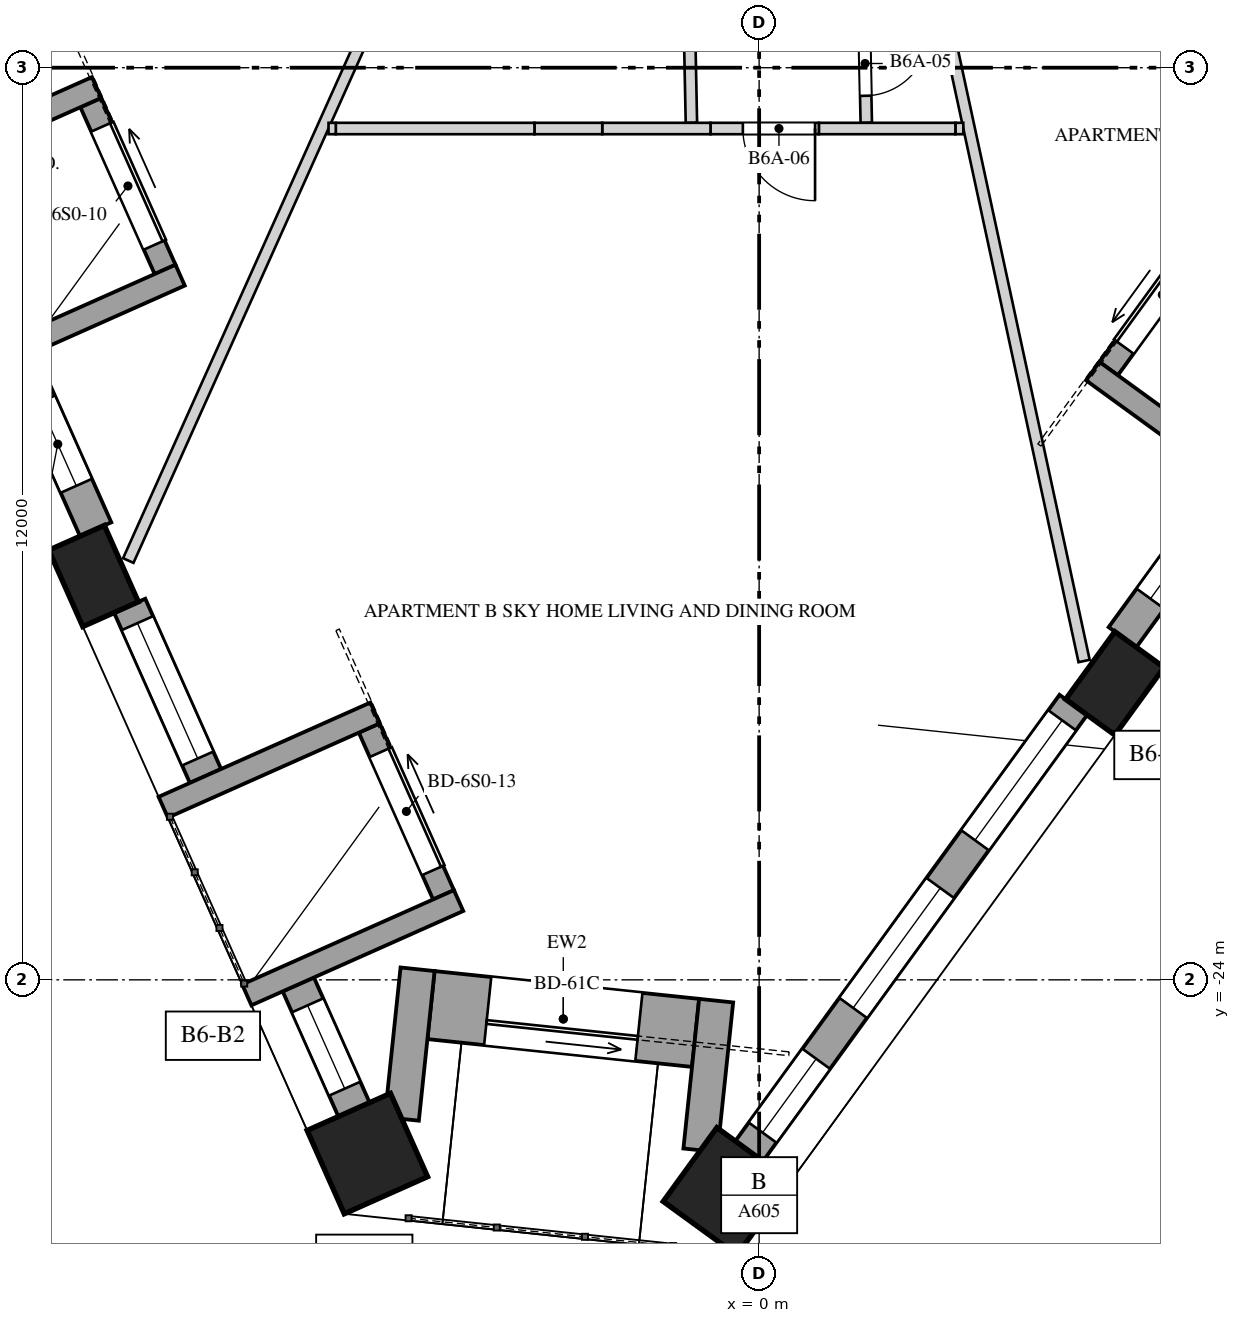
"""IFC4 building model, lengths in metres.
Left out: names, types, materials, properties, quantities, classifications, styles, units other than length and angle.
Written with IfcOpenShell. Run it as: python <this file> out.ifc"""

import sys

from ifc_helpers import new_model, si_unit, direction, frame, frame_2d, origin, origin_2d, place, context, subcontext, project, spatial, polyline, rectangle, outline, extrude, element, fill, save


model = new_model("IFC4")
c1 = context("Model", 3, precision=1e-05, world=origin(), true_north=direction((0.0, 1.0)))
c2 = subcontext(c1, "Body", "Model", "MODEL_VIEW")
j1 = project(units=[si_unit("LENGTHUNIT", "METRE"), si_unit("PLANEANGLEUNIT", "RADIAN")], contexts=[c1])
p1 = place(None, origin())
s1 = spatial("IfcSite", under=j1, at=p1, CompositionType="ELEMENT")
p2 = place(p1, origin())
s2 = spatial("IfcBuilding", under=s1, at=p2, CompositionType="ELEMENT")
p3 = place(p2, frame((0.0, 0.0, 241.2)))
s3 = spatial("IfcBuildingStorey", under=s2, at=p3, CompositionType="ELEMENT", Elevation=241.2)
p4 = place(p3, frame((-8.756, -18.687, 0.0), z_axis=(0.0, 0.0, 1.0), x_axis=(0.406736643076, -0.913545457643, 0.0)))
e1 = element("IfcColumn", 1, at=p4, inside=s3, PredefinedType="COLUMN", context=c2, shape_type="SweptSolid", body=[
    extrude(rectangle(XDim=1.1, YDim=0.8, at=origin_2d()), origin(), (0.0, 0.0, 1.0), 4.0),
])
for number, where, z_axis, x_axis in (
    (2, (-5.154, -26.286, 0.0), (0.0, 0.0, 1.0), (0.407, -0.914, 0.0)),
    (3, (-0.423, -26.783, 0.0), (0.0, 0.0, 1.0), (0.588, 0.809, 0.0)),
):
    element("IfcColumn", number, at=place(p3, frame(where, z_axis=z_axis, x_axis=x_axis)), inside=s3, PredefinedType="COLUMN", context=c2, shape_type="SweptSolid", body=[
        extrude(rectangle(XDim=1.2, YDim=1.2, at=origin_2d()), origin(), (0.0, 0.0, 1.0), 4.0),
    ])
p5 = place(p3, frame((4.68, -20.099, 0.0), z_axis=(0.0, 0.0, 1.0), x_axis=(0.587785252292, 0.809016994375, 0.0)))
e4 = element("IfcColumn", 4, at=p5, inside=s3, PredefinedType="COLUMN", context=c2, shape_type="SweptSolid", body=[
    extrude(rectangle(XDim=1.1, YDim=0.8, at=origin_2d()), origin(), (0.0, 0.0, 1.0), 4.0),
])
p6 = place(p3, frame((-9.726, -15.833, 0.0), z_axis=(0.0, 0.0, 1.0), x_axis=(0.406701876909, -0.913560935745, 0.0)))
e5 = element("IfcWall", 5, at=p6, inside=s3, PredefinedType="SOLIDWALL", context=c2, shape_type="SweptSolid", body=[
    extrude(rectangle(XDim=2.452, YDim=0.45, at=frame_2d((1.226, 0.0))), origin(), (0.0, 0.0, 1.0), 3.3),
])
p7 = place(p6, frame((0.626, 0.0, 0.4)))
e6 = element("IfcOpeningElement", 6, at=p7, cuts=e5, PredefinedType="OPENING", context=c2, shape_type="SweptSolid", body=[
    extrude(rectangle(XDim=1.2, YDim=2.75, at=frame_2d((0.6, 1.375))), frame((0.0, 0.235, 0.0), z_axis=(0.0, -1.0, 0.0), x_axis=(1.0, 0.0, 0.0)), (0.0, 0.0, 1.0), 0.47),
])
p8 = place(p3, frame((-8.281, -19.078, 0.0), z_axis=(0.0, 0.0, 1.0), x_axis=(0.406701876909, -0.913560935745, 0.0)))
e7 = element("IfcWall", 7, at=p8, inside=s3, PredefinedType="SOLIDWALL", context=c2, shape_type="SweptSolid", body=[
    extrude(rectangle(XDim=2.452, YDim=0.45, at=frame_2d((1.226, 0.0))), origin(), (0.0, 0.0, 1.0), 3.3),
])
p9 = place(p8, frame((0.251, 0.0, 0.4)))
e8 = element("IfcOpeningElement", 8, at=p9, cuts=e7, PredefinedType="OPENING", context=c2, shape_type="SweptSolid", body=[
    extrude(rectangle(XDim=1.95, YDim=2.75, at=frame_2d((0.975, 1.375))), frame((0.0, 0.235, 0.0), z_axis=(0.0, -1.0, 0.0), x_axis=(1.0, 0.0, 0.0)), (0.0, 0.0, 1.0), 0.47),
])
p10 = place(p3, frame((-6.063, -24.061, 0.0), z_axis=(0.0, 0.0, 1.0), x_axis=(0.406666293293, -0.913576776138, 0.0)))
e9 = element("IfcWall", 9, at=p10, inside=s3, PredefinedType="SOLIDWALL", context=c2, shape_type="SweptSolid", body=[
    extrude(rectangle(XDim=1.802, YDim=0.45, at=frame_2d((0.901, 0.0))), origin(), (0.0, 0.0, 1.0), 3.3),
])
p11 = place(p10, frame((0.301, 0.0, 0.4)))
e10 = element("IfcOpeningElement", 10, at=p11, cuts=e9, PredefinedType="OPENING", context=c2, shape_type="SweptSolid", body=[
    extrude(rectangle(XDim=1.2, YDim=2.1, at=frame_2d((0.6, 1.05))), frame((0.0, 0.235, 0.0), z_axis=(0.0, -1.0, 0.0), x_axis=(1.0, 0.0, 0.0)), (0.0, 0.0, 1.0), 0.47),
])
p12 = place(p3, frame((-0.131, -26.253, 0.0), z_axis=(0.0, 0.0, 1.0), x_axis=(0.587781549195, 0.80901968482, 0.0)))
e11 = element("IfcWall", 11, at=p12, inside=s3, PredefinedType="SOLIDWALL", context=c2, shape_type="SweptSolid", body=[
    extrude(rectangle(XDim=7.257, YDim=0.45, at=frame_2d((3.628, 0.0))), origin(), (0.0, 0.0, 1.0), 3.3),
])
p13 = place(p12, frame((0.301, 0.0, 0.4)))
e12 = element("IfcOpeningElement", 12, at=p13, cuts=e11, PredefinedType="OPENING", context=c2, shape_type="SweptSolid", body=[
    extrude(rectangle(XDim=1.2, YDim=2.1, at=frame_2d((0.6, 1.05))), frame((0.0, 0.235, 0.0), z_axis=(0.0, -1.0, 0.0), x_axis=(1.0, 0.0, 0.0)), (0.0, 0.0, 1.0), 0.47),
])
p14 = place(p12, frame((2.328, 0.0, 0.4)))
e13 = element("IfcOpeningElement", 13, at=p14, cuts=e11, PredefinedType="OPENING", context=c2, shape_type="SweptSolid", body=[
    extrude(rectangle(XDim=1.95, YDim=2.75, at=frame_2d((0.975, 1.375))), frame((0.0, 0.235, 0.0), z_axis=(0.0, -1.0, 0.0), x_axis=(1.0, 0.0, 0.0)), (0.0, 0.0, 1.0), 0.47),
])
p15 = place(p12, frame((5.056, 0.0, 0.4)))
e14 = element("IfcOpeningElement", 14, at=p15, cuts=e11, PredefinedType="OPENING", context=c2, shape_type="SweptSolid", body=[
    extrude(rectangle(XDim=1.95, YDim=2.75, at=frame_2d((0.975, 1.375))), frame((0.0, 0.235, 0.0), z_axis=(0.0, -1.0, 0.0), x_axis=(1.0, 0.0, 0.0)), (0.0, 0.0, 1.0), 0.47),
])
p16 = place(p3, frame((4.781, -19.493, 0.0), z_axis=(0.0, 0.0, 1.0), x_axis=(0.587792773076, 0.809011530152, 0.0)))
e15 = element("IfcWall", 15, at=p16, inside=s3, PredefinedType="SOLIDWALL", context=c2, shape_type="SweptSolid", body=[
    extrude(rectangle(XDim=2.452, YDim=0.45, at=frame_2d((1.226, 0.0))), origin(), (0.0, 0.0, 1.0), 3.3),
])
p17 = place(p16, frame((0.626, 0.0, 0.4)))
e16 = element("IfcOpeningElement", 16, at=p17, cuts=e15, PredefinedType="OPENING", context=c2, shape_type="SweptSolid", body=[
    extrude(rectangle(XDim=1.2, YDim=2.75, at=frame_2d((0.6, 1.375))), frame((0.0, 0.235, 0.0), z_axis=(0.0, -1.0, 0.0), x_axis=(1.0, 0.0, 0.0)), (0.0, 0.0, 1.0), 0.47),
])
p18 = place(p3, frame((-8.793, -12.459, 0.0), z_axis=(0.0, 0.0, 1.0), x_axis=(0.406723017018, -0.913551524232, 0.0)))
e17 = element("IfcWall", 17, at=p18, inside=s3, PredefinedType="SOLIDWALL", context=c2, shape_type="SweptSolid", body=[
    extrude(rectangle(XDim=2.402, YDim=0.3, at=frame_2d((1.201, 0.0))), origin(), (0.0, 0.0, 1.0), 3.3),
])
p19 = place(p18, frame((0.351, 0.0, 0.0)))
e18 = element("IfcOpeningElement", 18, at=p19, cuts=e17, PredefinedType="OPENING", context=c2, shape_type="SweptSolid", body=[
    extrude(rectangle(XDim=1.7, YDim=2.5, at=frame_2d((0.85, 1.25))), frame((0.0, 0.16, 0.0), z_axis=(0.0, -1.0, 0.0), x_axis=(1.0, 0.0, 0.0)), (0.0, 0.0, 1.0), 0.32),
])
for number, where, z_axis, x_axis in (
    (19, (-11.503, -13.501, 0.0), (0.0, 0.0, 1.0), (0.914, 0.407, 0.0)),
    (20, (-10.404, -15.97, 0.0), (0.0, 0.0, 1.0), (0.914, 0.407, 0.0)),
):
    element("IfcWall", number, at=place(p3, frame(where, z_axis=z_axis, x_axis=x_axis)), inside=s3, PredefinedType="SOLIDWALL", context=c2, shape_type="SweptSolid", body=[
        extrude(rectangle(XDim=3.05, YDim=0.3, at=frame_2d((1.525, 0.0))), origin(), (0.0, 0.0, 1.0), 3.3),
    ])
p20 = place(p3, frame((-5.129, -20.687, 0.0), z_axis=(0.0, 0.0, 1.0), x_axis=(0.406723017018, -0.913551524232, 0.0)))
e21 = element("IfcWall", 21, at=p20, inside=s3, PredefinedType="SOLIDWALL", context=c2, shape_type="SweptSolid", body=[
    extrude(rectangle(XDim=2.402, YDim=0.3, at=frame_2d((1.201, 0.0))), origin(), (0.0, 0.0, 1.0), 3.3),
])
p21 = place(p20, frame((0.351, 0.0, 0.0)))
e22 = element("IfcOpeningElement", 22, at=p21, cuts=e21, PredefinedType="OPENING", context=c2, shape_type="SweptSolid", body=[
    extrude(rectangle(XDim=1.7, YDim=2.5, at=frame_2d((0.85, 1.25))), frame((0.0, 0.16, 0.0), z_axis=(0.0, -1.0, 0.0), x_axis=(1.0, 0.0, 0.0)), (0.0, 0.0, 1.0), 0.32),
])
for number, where, z_axis, x_axis in (
    (23, (-7.84, -21.729, 0.0), (0.0, 0.0, 1.0), (0.914, 0.407, 0.0)),
    (24, (-6.74, -24.198, 0.0), (0.0, 0.0, 1.0), (0.914, 0.407, 0.0)),
):
    element("IfcWall", number, at=place(p3, frame(where, z_axis=z_axis, x_axis=x_axis)), inside=s3, PredefinedType="SOLIDWALL", context=c2, shape_type="SweptSolid", body=[
        extrude(rectangle(XDim=3.05, YDim=0.3, at=frame_2d((1.525, 0.0))), origin(), (0.0, 0.0, 1.0), 3.3),
    ])
p22 = place(p3, frame((4.598, -15.958, 0.0), z_axis=(0.0, 0.0, 1.0), x_axis=(0.587833242688, 0.808982125137, 0.0)))
e25 = element("IfcWall", 25, at=p22, inside=s3, PredefinedType="SOLIDWALL", context=c2, shape_type="SweptSolid", body=[
    extrude(rectangle(XDim=2.402, YDim=0.3, at=frame_2d((1.201, 0.0))), origin(), (0.0, 0.0, 1.0), 3.3),
])
p23 = place(p22, frame((0.351, 0.0, 0.0)))
e26 = element("IfcOpeningElement", 26, at=p23, cuts=e25, PredefinedType="OPENING", context=c2, shape_type="SweptSolid", body=[
    extrude(rectangle(XDim=1.7, YDim=2.5, at=frame_2d((0.85, 1.25))), frame((0.0, 0.16, 0.0), z_axis=(0.0, -1.0, 0.0), x_axis=(1.0, 0.0, 0.0)), (0.0, 0.0, 1.0), 0.32),
])
p24 = place(p3, frame((6.856, -17.784, 0.0), z_axis=(0.0, 0.0, 1.0), x_axis=(-0.80902328748, 0.587776590479, 0.0)))
e27 = element("IfcWall", 27, at=p24, inside=s3, PredefinedType="SOLIDWALL", context=c2, shape_type="SweptSolid", body=[
    extrude(rectangle(XDim=3.05, YDim=0.3, at=frame_2d((1.525, 0.0))), origin(), (0.0, 0.0, 1.0), 3.3),
])
p25 = place(p3, frame((-0.836, -24.698, 0.0), z_axis=(0.0, 0.0, 1.0), x_axis=(-0.994518821828, 0.104557701916, 0.0)))
e28 = element("IfcWall", 28, at=p25, inside=s3, PredefinedType="SOLIDWALL", context=c2, shape_type="SweptSolid", body=[
    extrude(rectangle(XDim=3.5, YDim=0.9, at=frame_2d((1.75, 0.0))), origin(), (0.0, 0.0, 1.0), 3.3),
])
p26 = place(p25, frame((0.75, 0.0, 0.0)))
e29 = element("IfcOpeningElement", 29, at=p26, cuts=e28, PredefinedType="OPENING", context=c2, shape_type="SweptSolid", body=[
    extrude(rectangle(XDim=2.0, YDim=2.4, at=frame_2d((1.0, 1.2))), frame((0.0, 0.46, 0.0), z_axis=(0.0, -1.0, 0.0), x_axis=(1.0, 0.0, 0.0)), (0.0, 0.0, 1.0), 0.92),
])
for number, where, z_axis, x_axis in (
    (30, (-0.772, -26.242, 0.0), (0.0, 0.0, 1.0), (0.104, 0.995, 0.0)),
    (31, (-4.701, -25.829, 0.0), (0.0, 0.0, 1.0), (0.105, 0.995, 0.0)),
):
    element("IfcWall", number, at=place(p3, frame(where, z_axis=z_axis, x_axis=x_axis)), inside=s3, PredefinedType="SOLIDWALL", context=c2, shape_type="SweptSolid", body=[
        extrude(rectangle(XDim=1.979, YDim=0.45, at=frame_2d((0.99, 0.0))), origin(), (0.0, 0.0, 1.0), 2.55),
    ])
p27 = place(p3, frame((-8.3, -18.484, 0.0), z_axis=(0.0, 0.0, 1.0), x_axis=(0.409625524412, 0.9122537639, 0.0)))
e32 = element("IfcWall", 32, at=p27, inside=s3, PredefinedType="PARTITIONING", context=c2, shape_type="SweptSolid", body=[
    extrude(rectangle(XDim=9.327, YDim=0.15, at=frame_2d((4.664, 0.0))), origin(), (0.0, 0.0, 1.0), 2.75),
])
p28 = place(p3, frame((-0.891, -12.725, 0.0), z_axis=(0.0, 0.0, 1.0), x_axis=(-0.020389814815, 0.999792106116, 0.0)))
e33 = element("IfcWall", 33, at=p28, inside=s3, PredefinedType="PARTITIONING", context=c2, shape_type="SweptSolid", body=[
    extrude(rectangle(XDim=2.826, YDim=0.15, at=frame_2d((1.413, 0.0))), origin(), (0.0, 0.0, 1.0), 3.65),
])
p29 = place(p3, frame((1.352, -9.9, 0.0), z_axis=(0.0, 0.0, 1.0), x_axis=(0.020303452986, -0.999793863652, 0.0)))
e34 = element("IfcWall", 34, at=p29, inside=s3, PredefinedType="PARTITIONING", context=c2, shape_type="SweptSolid", body=[
    extrude(rectangle(XDim=2.826, YDim=0.15, at=frame_2d((1.413, 0.0))), origin(), (0.0, 0.0, 1.0), 3.65),
])
p30 = place(p29, frame((1.62, 0.0, 0.0)))
e35 = element("IfcOpeningElement", 35, at=p30, cuts=e34, PredefinedType="OPENING", context=c2, shape_type="SweptSolid", body=[
    extrude(rectangle(XDim=0.85, YDim=2.4, at=frame_2d((0.425, 1.2))), frame((0.0, 0.085, 0.0), z_axis=(0.0, -1.0, 0.0), x_axis=(1.0, 0.0, 0.0)), (0.0, 0.0, 1.0), 0.17),
])
p31 = place(p3, frame((2.153, -9.975, 0.0), z_axis=(0.0, 0.0, 1.0), x_axis=(0.210986150263, -0.977489050781, 0.0)))
e36 = element("IfcWall", 36, at=p31, inside=s3, PredefinedType="PARTITIONING", context=c2, shape_type="SweptSolid", body=[
    extrude(rectangle(XDim=10.057, YDim=0.15, at=frame_2d((5.028, 0.0))), origin(), (0.0, 0.0, 1.0), 2.75),
])
p32 = place(p3, frame((2.686, -12.8, 0.0), z_axis=(0.0, 0.0, 1.0), x_axis=(-1.0, 0.0, 0.0)))
e37 = element("IfcWall", 37, at=p32, inside=s3, PredefinedType="PARTITIONING", context=c2, shape_type="SweptSolid", body=[
    extrude(rectangle(XDim=0.104, YDim=0.15, at=frame_2d((0.052, 0.0))), origin(), (0.0, 0.0, 1.0), 2.75),
])
p33 = place(p3, frame((2.582, -12.8, 0.0), z_axis=(0.0, 0.0, 1.0), x_axis=(-1.0, 0.0, 0.0)))
e38 = element("IfcWall", 38, at=p33, inside=s3, PredefinedType="PARTITIONING", context=c2, shape_type="SweptSolid", body=[
    extrude(rectangle(XDim=1.796, YDim=0.15, at=frame_2d((0.898, 0.0))), origin(), (0.0, 0.0, 1.0), 3.65),
])
p34 = place(p3, frame((0.786, -12.8, 0.0), z_axis=(0.0, 0.0, 1.0), x_axis=(-1.0, 0.0, 0.0)))
e39 = element("IfcWall", 39, at=p34, inside=s3, PredefinedType="PARTITIONING", context=c2, shape_type="SweptSolid", body=[
    extrude(outline(polyline([(0.0, 0.0), (1.426, 0.0), (1.426, 2.55), (0.551, 2.55), (0.551, 3.65), (0.0, 3.65), (0.0, 0.0)])), frame((0.0, 0.075, 0.0), z_axis=(0.0, -1.0, 0.0), x_axis=(1.0, 0.0, 0.0)), (0.0, 0.0, 1.0), 0.15),
])
p35 = place(p34, frame((0.05, 0.0, 0.0)))
e40 = element("IfcOpeningElement", 40, at=p35, cuts=e39, PredefinedType="OPENING", context=c2, shape_type="SweptSolid", body=[
    extrude(rectangle(XDim=0.95, YDim=2.4, at=frame_2d((0.475, 1.2))), frame((0.0, 0.085, 0.0), z_axis=(0.0, -1.0, 0.0), x_axis=(1.0, 0.0, 0.0)), (0.0, 0.0, 1.0), 0.17),
])
p36 = place(p3, frame((-0.64, -12.8, 0.0), z_axis=(0.0, 0.0, 1.0), x_axis=(-1.0, 0.0, 0.0)))
e41 = element("IfcWall", 41, at=p36, inside=s3, PredefinedType="PARTITIONING", context=c2, shape_type="SweptSolid", body=[
    extrude(rectangle(XDim=1.424, YDim=0.15, at=frame_2d((0.712, 0.0))), origin(), (0.0, 0.0, 1.0), 3.65),
])
p37 = place(p3, frame((-2.064, -12.8, 0.0), z_axis=(0.0, 0.0, 1.0), x_axis=(-1.0, 0.0, 0.0)))
e42 = element("IfcWall", 42, at=p37, inside=s3, PredefinedType="PARTITIONING", context=c2, shape_type="SweptSolid", body=[
    extrude(rectangle(XDim=0.892, YDim=0.15, at=frame_2d((0.446, 0.0))), origin(), (0.0, 0.0, 1.0), 2.55),
])
p38 = place(p3, frame((-2.956, -12.8, 0.0), z_axis=(0.0, 0.0, 1.0), x_axis=(-1.0, 0.0, 0.0)))
e43 = element("IfcWall", 43, at=p38, inside=s3, PredefinedType="PARTITIONING", context=c2, shape_type="SweptSolid", body=[
    extrude(rectangle(XDim=2.614, YDim=0.15, at=frame_2d((1.307, 0.0))), origin(), (0.0, 0.0, 1.0), 3.65),
])
p39 = place(p3, frame((-5.57, -12.8, 0.0), z_axis=(0.0, 0.0, 1.0), x_axis=(-1.0, 0.0, 0.0)))
e44 = element("IfcWall", 44, at=p39, inside=s3, PredefinedType="PARTITIONING", context=c2, shape_type="SweptSolid", body=[
    extrude(rectangle(XDim=0.095, YDim=0.15, at=frame_2d((0.048, 0.0))), origin(), (0.0, 0.0, 1.0), 2.75),
])
p40 = place(p7, origin())
e45 = element("IfcWindow", 45, at=p40, inside=s3, PartitioningType="SINGLE_PANEL", PredefinedType="WINDOW", context=c2, shape_type="SweptSolid", body=[
    extrude(rectangle(XDim=1.2, YDim=2.75, at=frame_2d((0.6, 1.375))), frame((0.0, 0.03, 0.0), z_axis=(0.0, -1.0, 0.0), x_axis=(1.0, 0.0, 0.0)), (0.0, 0.0, 1.0), 0.06),
])
fill(e6, e45)
p41 = place(p9, origin())
e46 = element("IfcWindow", 46, at=p41, inside=s3, PartitioningType="SINGLE_PANEL", PredefinedType="WINDOW", context=c2, shape_type="SweptSolid", body=[
    extrude(rectangle(XDim=1.95, YDim=2.75, at=frame_2d((0.975, 1.375))), frame((0.0, 0.03, 0.0), z_axis=(0.0, -1.0, 0.0), x_axis=(1.0, 0.0, 0.0)), (0.0, 0.0, 1.0), 0.06),
])
fill(e8, e46)
p42 = place(p11, origin())
e47 = element("IfcWindow", 47, at=p42, inside=s3, PartitioningType="SINGLE_PANEL", PredefinedType="WINDOW", context=c2, shape_type="SweptSolid", body=[
    extrude(rectangle(XDim=1.2, YDim=2.1, at=frame_2d((0.6, 1.05))), frame((0.0, 0.03, 0.0), z_axis=(0.0, -1.0, 0.0), x_axis=(1.0, 0.0, 0.0)), (0.0, 0.0, 1.0), 0.06),
])
fill(e10, e47)
p43 = place(p13, origin())
e48 = element("IfcWindow", 48, at=p43, inside=s3, PartitioningType="SINGLE_PANEL", PredefinedType="WINDOW", context=c2, shape_type="SweptSolid", body=[
    extrude(rectangle(XDim=1.2, YDim=2.1, at=frame_2d((0.6, 1.05))), frame((0.0, 0.03, 0.0), z_axis=(0.0, -1.0, 0.0), x_axis=(1.0, 0.0, 0.0)), (0.0, 0.0, 1.0), 0.06),
])
fill(e12, e48)
p44 = place(p14, origin())
e49 = element("IfcWindow", 49, at=p44, inside=s3, PartitioningType="SINGLE_PANEL", PredefinedType="WINDOW", context=c2, shape_type="SweptSolid", body=[
    extrude(rectangle(XDim=1.95, YDim=2.75, at=frame_2d((0.975, 1.375))), frame((0.0, 0.03, 0.0), z_axis=(0.0, -1.0, 0.0), x_axis=(1.0, 0.0, 0.0)), (0.0, 0.0, 1.0), 0.06),
])
fill(e13, e49)
p45 = place(p15, origin())
e50 = element("IfcWindow", 50, at=p45, inside=s3, PartitioningType="SINGLE_PANEL", PredefinedType="WINDOW", context=c2, shape_type="SweptSolid", body=[
    extrude(rectangle(XDim=1.95, YDim=2.75, at=frame_2d((0.975, 1.375))), frame((0.0, 0.03, 0.0), z_axis=(0.0, -1.0, 0.0), x_axis=(1.0, 0.0, 0.0)), (0.0, 0.0, 1.0), 0.06),
])
fill(e14, e50)
p46 = place(p17, origin())
e51 = element("IfcWindow", 51, at=p46, inside=s3, PartitioningType="SINGLE_PANEL", PredefinedType="WINDOW", context=c2, shape_type="SweptSolid", body=[
    extrude(rectangle(XDim=1.2, YDim=2.75, at=frame_2d((0.6, 1.375))), frame((0.0, 0.03, 0.0), z_axis=(0.0, -1.0, 0.0), x_axis=(1.0, 0.0, 0.0)), (0.0, 0.0, 1.0), 0.06),
])
fill(e16, e51)
p47 = place(p19, origin())
e52 = element("IfcDoor", 52, at=p47, inside=s3, OperationType="SLIDING_TO_LEFT", PredefinedType="DOOR", context=c2, shape_type="SweptSolid", body=[
    extrude(rectangle(XDim=1.7, YDim=2.5, at=frame_2d((0.85, 1.25))), frame((0.0, 0.025, 0.0), z_axis=(0.0, -1.0, 0.0), x_axis=(1.0, 0.0, 0.0)), (0.0, 0.0, 1.0), 0.05),
])
fill(e18, e52)
p48 = place(p21, origin())
e53 = element("IfcDoor", 53, at=p48, inside=s3, OperationType="SLIDING_TO_LEFT", PredefinedType="DOOR", context=c2, shape_type="SweptSolid", body=[
    extrude(rectangle(XDim=1.7, YDim=2.5, at=frame_2d((0.85, 1.25))), frame((0.0, 0.025, 0.0), z_axis=(0.0, -1.0, 0.0), x_axis=(1.0, 0.0, 0.0)), (0.0, 0.0, 1.0), 0.05),
])
fill(e22, e53)
p49 = place(p23, origin())
e54 = element("IfcDoor", 54, at=p49, inside=s3, OperationType="SLIDING_TO_LEFT", PredefinedType="DOOR", context=c2, shape_type="SweptSolid", body=[
    extrude(rectangle(XDim=1.7, YDim=2.5, at=frame_2d((0.85, 1.25))), frame((0.0, 0.025, 0.0), z_axis=(0.0, -1.0, 0.0), x_axis=(1.0, 0.0, 0.0)), (0.0, 0.0, 1.0), 0.05),
])
fill(e26, e54)
p50 = place(p26, origin())
e55 = element("IfcDoor", 55, at=p50, inside=s3, OperationType="SLIDING_TO_LEFT", PredefinedType="DOOR", context=c2, shape_type="SweptSolid", body=[
    extrude(rectangle(XDim=2.0, YDim=2.4, at=frame_2d((1.0, 1.2))), frame((0.0, 0.025, 0.0), z_axis=(0.0, -1.0, 0.0), x_axis=(1.0, 0.0, 0.0)), (0.0, 0.0, 1.0), 0.05),
])
fill(e29, e55)
p51 = place(p30, origin())
e56 = element("IfcDoor", 56, at=p51, inside=s3, OperationType="SINGLE_SWING_LEFT", PredefinedType="DOOR", context=c2, shape_type="SweptSolid", body=[
    extrude(rectangle(XDim=0.85, YDim=2.4, at=frame_2d((0.425, 1.2))), frame((0.0, 0.025, 0.0), z_axis=(0.0, -1.0, 0.0), x_axis=(1.0, 0.0, 0.0)), (0.0, 0.0, 1.0), 0.05),
])
fill(e35, e56)
p52 = place(p35, origin())
e57 = element("IfcDoor", 57, at=p52, inside=s3, OperationType="SINGLE_SWING_RIGHT", PredefinedType="DOOR", context=c2, shape_type="SweptSolid", body=[
    extrude(rectangle(XDim=0.95, YDim=2.4, at=frame_2d((0.475, 1.2))), frame((0.0, 0.025, 0.0), z_axis=(0.0, -1.0, 0.0), x_axis=(1.0, 0.0, 0.0)), (0.0, 0.0, 1.0), 0.05),
])
fill(e40, e57)
save(model, sys.argv[1])
